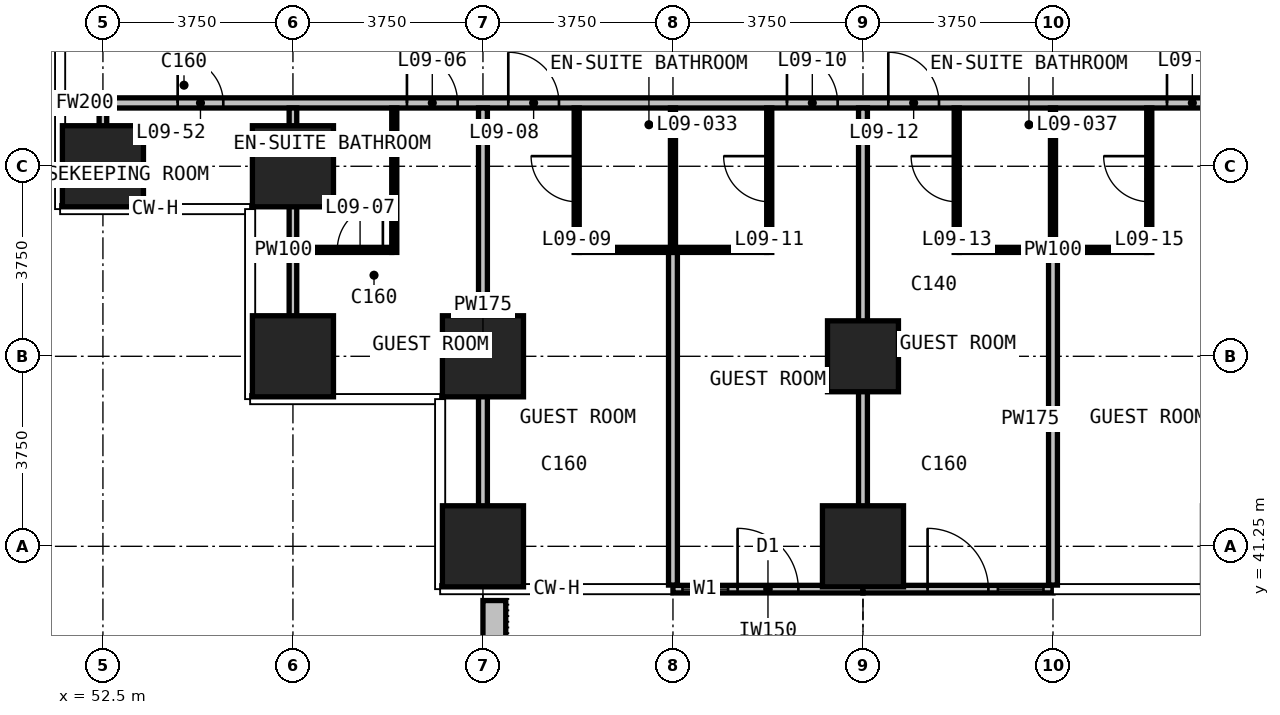
"""IFC4 building model, lengths in metres.
Left out: names, types, materials, properties, quantities, classifications, styles, units other than length and angle.
Written with IfcOpenShell. Run it as: python <this file> out.ifc"""

import sys

from ifc_helpers import new_model, si_unit, direction, frame, frame_2d, origin, origin_2d, place, context, subcontext, project, spatial, rectangle, extrude, element, fill, save


model = new_model("IFC4")
c1 = context("Model", 3, precision=1e-05, world=origin(), true_north=direction((0.0, 1.0)))
c2 = subcontext(c1, "Body", "Model", "MODEL_VIEW")
j1 = project(units=[si_unit("LENGTHUNIT", "METRE"), si_unit("PLANEANGLEUNIT", "RADIAN")], contexts=[c1])
p1 = place(None, origin())
s1 = spatial("IfcSite", under=j1, at=p1, CompositionType="ELEMENT")
p2 = place(p1, origin())
s2 = spatial("IfcBuilding", under=s1, at=p2, CompositionType="ELEMENT")
p3 = place(p2, frame((0.0, 0.0, 49.4)))
s3 = spatial("IfcBuildingStorey", under=s2, at=p3, CompositionType="ELEMENT", Elevation=49.4)
for number, where, z_axis, x_axis in (
    (1, (52.5, 48.75, 0.0), (0.0, 0.0, 1.0), (1.0, 0.0, 0.0)),
    (2, (56.25, 45.0, 0.0), (0.0, 0.0, 1.0), (1.0, 0.0, 0.0)),
    (3, (56.25, 48.75, 0.0), (0.0, 0.0, 1.0), (1.0, 0.0, 0.0)),
    (4, (60.0, 41.25, 0.0), (0.0, 0.0, 1.0), (1.0, 0.0, 0.0)),
    (5, (60.0, 45.0, 0.0), (0.0, 0.0, 1.0), (1.0, 0.0, 0.0)),
    (6, (67.5, 41.25, 0.0), (0.0, 0.0, 1.0), (1.0, 0.0, 0.0)),
):
    element("IfcColumn", number, at=place(p3, frame(where, z_axis=z_axis, x_axis=x_axis)), inside=s3, PredefinedType="COLUMN", context=c2, shape_type="SweptSolid", body=[
        extrude(rectangle(XDim=1.6, YDim=1.6, at=origin_2d()), origin(), (0.0, 0.0, 1.0), 3.3),
    ])
p4 = place(p3, frame((67.5, 45.0, 0.0), z_axis=(0.0, 0.0, 1.0), x_axis=(1.0, 0.0, 0.0)))
e7 = element("IfcColumn", 7, at=p4, inside=s3, PredefinedType="COLUMN", context=c2, shape_type="SweptSolid", body=[
    extrude(rectangle(XDim=1.4, YDim=1.4, at=origin_2d()), origin(), (0.0, 0.0, 1.0), 3.3),
])
p5 = place(p3, frame((63.75, 40.405, 0.0), z_axis=(0.0, 0.0, 1.0), x_axis=(1.0, 0.0, 0.0)))
e8 = element("IfcWall", 8, at=p5, inside=s3, PredefinedType="SOLIDWALL", context=c2, shape_type="SweptSolid", body=[
    extrude(rectangle(XDim=3.75, YDim=0.15, at=frame_2d((1.875, 0.0))), origin(), (0.0, 0.0, 1.0), 3.0),
])
p6 = place(p5, frame((0.188, 0.0, 0.1)))
e9 = element("IfcOpeningElement", 9, at=p6, cuts=e8, PredefinedType="OPENING", context=c2, shape_type="SweptSolid", body=[
    extrude(rectangle(XDim=0.9, YDim=2.4, at=frame_2d((0.45, 1.2))), frame((0.0, 0.085, 0.0), z_axis=(0.0, -1.0, 0.0), x_axis=(1.0, 0.0, 0.0)), (0.0, 0.0, 1.0), 0.17),
])
p7 = place(p5, frame((1.275, 0.0, 0.0)))
e10 = element("IfcOpeningElement", 10, at=p7, cuts=e8, PredefinedType="OPENING", context=c2, shape_type="SweptSolid", body=[
    extrude(rectangle(XDim=1.2, YDim=2.4, at=frame_2d((0.6, 1.2))), frame((0.0, 0.085, 0.0), z_axis=(0.0, -1.0, 0.0), x_axis=(1.0, 0.0, 0.0)), (0.0, 0.0, 1.0), 0.17),
])
p8 = place(p3, frame((67.5, 40.405, 0.0), z_axis=(0.0, 0.0, 1.0), x_axis=(1.0, 0.0, 0.0)))
e11 = element("IfcWall", 11, at=p8, inside=s3, PredefinedType="SOLIDWALL", context=c2, shape_type="SweptSolid", body=[
    extrude(rectangle(XDim=3.75, YDim=0.15, at=frame_2d((1.875, 0.0))), origin(), (0.0, 0.0, 1.0), 3.0),
])
p9 = place(p8, frame((1.275, 0.0, 0.0)))
e12 = element("IfcOpeningElement", 12, at=p9, cuts=e11, PredefinedType="OPENING", context=c2, shape_type="SweptSolid", body=[
    extrude(rectangle(XDim=1.2, YDim=2.4, at=frame_2d((0.6, 1.2))), frame((0.0, 0.085, 0.0), z_axis=(0.0, -1.0, 0.0), x_axis=(1.0, 0.0, 0.0)), (0.0, 0.0, 1.0), 0.17),
])
p10 = place(p8, frame((2.663, 0.0, 0.1)))
e13 = element("IfcOpeningElement", 13, at=p10, cuts=e11, PredefinedType="OPENING", context=c2, shape_type="SweptSolid", body=[
    extrude(rectangle(XDim=0.9, YDim=2.4, at=frame_2d((0.45, 1.2))), frame((0.0, 0.085, 0.0), z_axis=(0.0, -1.0, 0.0), x_axis=(1.0, 0.0, 0.0)), (0.0, 0.0, 1.0), 0.17),
])
p11 = place(p3, frame((60.225, 40.18, 0.0), z_axis=(0.0, 0.0, 1.0), x_axis=(0.0, -1.0, 0.0)))
e14 = element("IfcWall", 14, at=p11, inside=s3, PredefinedType="USERDEFINED", context=c2, shape_type="SweptSolid", body=[
    extrude(rectangle(XDim=2.33, YDim=0.45, at=frame_2d((1.165, 0.0))), origin(), (0.0, 0.0, 1.0), 1.1),
])
p12 = place(p3, frame((51.855, 50.0, 0.0), z_axis=(0.0, 0.0, 1.0), x_axis=(1.0, 0.0, 0.0)))
e15 = element("IfcWall", 15, at=p12, inside=s3, PredefinedType="PARTITIONING", context=c2, shape_type="SweptSolid", body=[
    extrude(rectangle(XDim=0.57, YDim=0.2, at=frame_2d((0.285, 0.0))), origin(), (0.0, 0.0, 1.0), 3.0),
])
p13 = place(p3, frame((52.575, 50.0, 0.0), z_axis=(0.0, 0.0, 1.0), x_axis=(1.0, 0.0, 0.0)))
e16 = element("IfcWall", 16, at=p13, inside=s3, PredefinedType="PARTITIONING", context=c2, shape_type="SweptSolid", body=[
    extrude(rectangle(XDim=44.85, YDim=0.2, at=frame_2d((22.425, 0.0))), origin(), (0.0, 0.0, 1.0), 3.0),
])
p14 = place(p13, frame((5.925, 0.0, 0.0)))
e17 = element("IfcOpeningElement", 17, at=p14, cuts=e16, PredefinedType="OPENING", context=c2, shape_type="SweptSolid", body=[
    extrude(rectangle(XDim=1.0, YDim=2.2, at=frame_2d((0.5, 1.1))), frame((0.0, 0.11, 0.0), z_axis=(0.0, -1.0, 0.0), x_axis=(1.0, 0.0, 0.0)), (0.0, 0.0, 1.0), 0.22),
])
p15 = place(p13, frame((7.925, 0.0, 0.0)))
e18 = element("IfcOpeningElement", 18, at=p15, cuts=e16, PredefinedType="OPENING", context=c2, shape_type="SweptSolid", body=[
    extrude(rectangle(XDim=1.0, YDim=2.2, at=frame_2d((0.5, 1.1))), frame((0.0, 0.11, 0.0), z_axis=(0.0, -1.0, 0.0), x_axis=(1.0, 0.0, 0.0)), (0.0, 0.0, 1.0), 0.22),
])
p16 = place(p13, frame((13.425, 0.0, 0.0)))
e19 = element("IfcOpeningElement", 19, at=p16, cuts=e16, PredefinedType="OPENING", context=c2, shape_type="SweptSolid", body=[
    extrude(rectangle(XDim=1.0, YDim=2.2, at=frame_2d((0.5, 1.1))), frame((0.0, 0.11, 0.0), z_axis=(0.0, -1.0, 0.0), x_axis=(1.0, 0.0, 0.0)), (0.0, 0.0, 1.0), 0.22),
])
p17 = place(p13, frame((15.425, 0.0, 0.0)))
e20 = element("IfcOpeningElement", 20, at=p17, cuts=e16, PredefinedType="OPENING", context=c2, shape_type="SweptSolid", body=[
    extrude(rectangle(XDim=1.0, YDim=2.2, at=frame_2d((0.5, 1.1))), frame((0.0, 0.11, 0.0), z_axis=(0.0, -1.0, 0.0), x_axis=(1.0, 0.0, 0.0)), (0.0, 0.0, 1.0), 0.22),
])
p18 = place(p13, frame((20.925, 0.0, 0.0)))
e21 = element("IfcOpeningElement", 21, at=p18, cuts=e16, PredefinedType="OPENING", context=c2, shape_type="SweptSolid", body=[
    extrude(rectangle(XDim=1.0, YDim=2.2, at=frame_2d((0.5, 1.1))), frame((0.0, 0.11, 0.0), z_axis=(0.0, -1.0, 0.0), x_axis=(1.0, 0.0, 0.0)), (0.0, 0.0, 1.0), 0.22),
])
p19 = place(p13, frame((22.925, 0.0, 0.0)))
e22 = element("IfcOpeningElement", 22, at=p19, cuts=e16, PredefinedType="OPENING", context=c2, shape_type="SweptSolid", body=[
    extrude(rectangle(XDim=1.0, YDim=2.2, at=frame_2d((0.5, 1.1))), frame((0.0, 0.11, 0.0), z_axis=(0.0, -1.0, 0.0), x_axis=(1.0, 0.0, 0.0)), (0.0, 0.0, 1.0), 0.22),
])
p20 = place(p13, frame((28.425, 0.0, 0.0)))
e23 = element("IfcOpeningElement", 23, at=p20, cuts=e16, PredefinedType="OPENING", context=c2, shape_type="SweptSolid", body=[
    extrude(rectangle(XDim=1.0, YDim=2.2, at=frame_2d((0.5, 1.1))), frame((0.0, 0.11, 0.0), z_axis=(0.0, -1.0, 0.0), x_axis=(1.0, 0.0, 0.0)), (0.0, 0.0, 1.0), 0.22),
])
p21 = place(p13, frame((30.425, 0.0, 0.0)))
e24 = element("IfcOpeningElement", 24, at=p21, cuts=e16, PredefinedType="OPENING", context=c2, shape_type="SweptSolid", body=[
    extrude(rectangle(XDim=1.0, YDim=2.2, at=frame_2d((0.5, 1.1))), frame((0.0, 0.11, 0.0), z_axis=(0.0, -1.0, 0.0), x_axis=(1.0, 0.0, 0.0)), (0.0, 0.0, 1.0), 0.22),
])
p22 = place(p13, frame((35.925, 0.0, 0.0)))
e25 = element("IfcOpeningElement", 25, at=p22, cuts=e16, PredefinedType="OPENING", context=c2, shape_type="SweptSolid", body=[
    extrude(rectangle(XDim=1.0, YDim=2.2, at=frame_2d((0.5, 1.1))), frame((0.0, 0.11, 0.0), z_axis=(0.0, -1.0, 0.0), x_axis=(1.0, 0.0, 0.0)), (0.0, 0.0, 1.0), 0.22),
])
p23 = place(p13, frame((37.925, 0.0, 0.0)))
e26 = element("IfcOpeningElement", 26, at=p23, cuts=e16, PredefinedType="OPENING", context=c2, shape_type="SweptSolid", body=[
    extrude(rectangle(XDim=1.0, YDim=2.2, at=frame_2d((0.5, 1.1))), frame((0.0, 0.11, 0.0), z_axis=(0.0, -1.0, 0.0), x_axis=(1.0, 0.0, 0.0)), (0.0, 0.0, 1.0), 0.22),
])
p24 = place(p13, frame((1.4, 0.0, 0.0)))
e27 = element("IfcOpeningElement", 27, at=p24, cuts=e16, PredefinedType="OPENING", context=c2, shape_type="SweptSolid", body=[
    extrude(rectangle(XDim=0.9, YDim=2.2, at=frame_2d((0.45, 1.1))), frame((0.0, 0.11, 0.0), z_axis=(0.0, -1.0, 0.0), x_axis=(1.0, 0.0, 0.0)), (0.0, 0.0, 1.0), 0.22),
])
p25 = place(p13, frame((42.575, 0.0, 0.0)))
e28 = element("IfcOpeningElement", 28, at=p25, cuts=e16, PredefinedType="OPENING", context=c2, shape_type="SweptSolid", body=[
    extrude(rectangle(XDim=0.9, YDim=2.2, at=frame_2d((0.45, 1.1))), frame((0.0, 0.11, 0.0), z_axis=(0.0, -1.0, 0.0), x_axis=(1.0, 0.0, 0.0)), (0.0, 0.0, 1.0), 0.22),
])
p26 = place(p3, frame((60.0, 40.485, 0.0), z_axis=(0.0, 0.0, 1.0), x_axis=(0.0, 1.0, 0.0)))
e29 = element("IfcWall", 29, at=p26, inside=s3, PredefinedType="PARTITIONING", context=c2, shape_type="SweptSolid", body=[
    extrude(rectangle(XDim=9.415, YDim=0.175, at=frame_2d((4.708, 0.0))), origin(), (0.0, 0.0, 1.0), 3.0),
])
p27 = place(p3, frame((63.75, 40.485, 0.0), z_axis=(0.0, 0.0, 1.0), x_axis=(0.0, 1.0, 0.0)))
e30 = element("IfcWall", 30, at=p27, inside=s3, PredefinedType="PARTITIONING", context=c2, shape_type="SweptSolid", body=[
    extrude(rectangle(XDim=6.565, YDim=0.175, at=frame_2d((3.282, 0.0))), origin(), (0.0, 0.0, 1.0), 3.0),
])
p28 = place(p3, frame((67.5, 40.485, 0.0), z_axis=(0.0, 0.0, 1.0), x_axis=(0.0, 1.0, 0.0)))
e31 = element("IfcWall", 31, at=p28, inside=s3, PredefinedType="PARTITIONING", context=c2, shape_type="SweptSolid", body=[
    extrude(rectangle(XDim=9.415, YDim=0.175, at=frame_2d((4.708, 0.0))), origin(), (0.0, 0.0, 1.0), 3.0),
])
p29 = place(p3, frame((71.25, 40.485, 0.0), z_axis=(0.0, 0.0, 1.0), x_axis=(0.0, 1.0, 0.0)))
e32 = element("IfcWall", 32, at=p29, inside=s3, PredefinedType="PARTITIONING", context=c2, shape_type="SweptSolid", body=[
    extrude(rectangle(XDim=6.565, YDim=0.175, at=frame_2d((3.282, 0.0))), origin(), (0.0, 0.0, 1.0), 3.0),
])
p30 = place(p3, frame((52.5, 48.105, 0.0), z_axis=(0.0, 0.0, 1.0), x_axis=(0.0, 1.0, 0.0)))
e33 = element("IfcWall", 33, at=p30, inside=s3, PredefinedType="PARTITIONING", context=c2, shape_type="SweptSolid", body=[
    extrude(rectangle(XDim=1.995, YDim=0.15, at=frame_2d((0.998, 0.0))), origin(), (0.0, 0.0, 1.0), 3.0),
])
p31 = place(p3, frame((56.25, 44.235, 0.0), z_axis=(0.0, 0.0, 1.0), x_axis=(0.0, 1.0, 0.0)))
e34 = element("IfcWall", 34, at=p31, inside=s3, PredefinedType="PARTITIONING", context=c2, shape_type="SweptSolid", body=[
    extrude(rectangle(XDim=5.665, YDim=0.15, at=frame_2d((2.833, 0.0))), origin(), (0.0, 0.0, 1.0), 3.0),
])
p32 = place(p3, frame((56.325, 47.1, 0.0), z_axis=(0.0, 0.0, 1.0), x_axis=(1.0, 0.0, 0.0)))
e35 = element("IfcWall", 35, at=p32, inside=s3, PredefinedType="PARTITIONING", context=c2, shape_type="SweptSolid", body=[
    extrude(rectangle(XDim=1.875, YDim=0.1, at=frame_2d((0.938, 0.0))), origin(), (0.0, 0.0, 1.0), 3.0),
])
p33 = place(p32, frame((0.8, 0.0, 0.0)))
e36 = element("IfcOpeningElement", 36, at=p33, cuts=e35, PredefinedType="OPENING", context=c2, shape_type="SweptSolid", body=[
    extrude(rectangle(XDim=0.9, YDim=2.2, at=frame_2d((0.45, 1.1))), frame((0.0, 0.06, 0.0), z_axis=(0.0, -1.0, 0.0), x_axis=(1.0, 0.0, 0.0)), (0.0, 0.0, 1.0), 0.12),
])
for number, where, z_axis, x_axis in (
    (37, (61.9, 47.1, 0.0), (0.0, 0.0, 1.0), (1.0, 0.0, 0.0)),
    (38, (69.4, 47.1, 0.0), (0.0, 0.0, 1.0), (1.0, 0.0, 0.0)),
):
    element("IfcWall", number, at=place(p3, frame(where, z_axis=z_axis, x_axis=x_axis)), inside=s3, PredefinedType="PARTITIONING", context=c2, shape_type="SweptSolid", body=[
        extrude(rectangle(XDim=3.7, YDim=0.1, at=frame_2d((1.85, 0.0))), origin(), (0.0, 0.0, 1.0), 3.0),
    ])
p34 = place(p3, frame((58.25, 47.05, 0.0), z_axis=(0.0, 0.0, 1.0), x_axis=(0.0, 1.0, 0.0)))
e39 = element("IfcWall", 39, at=p34, inside=s3, PredefinedType="PARTITIONING", context=c2, shape_type="SweptSolid", body=[
    extrude(rectangle(XDim=2.85, YDim=0.1, at=frame_2d((1.425, 0.0))), origin(), (0.0, 0.0, 1.0), 3.0),
])
p35 = place(p3, frame((61.85, 47.05, 0.0), z_axis=(0.0, 0.0, 1.0), x_axis=(0.0, 1.0, 0.0)))
e40 = element("IfcWall", 40, at=p35, inside=s3, PredefinedType="PARTITIONING", context=c2, shape_type="SweptSolid", body=[
    extrude(rectangle(XDim=2.85, YDim=0.1, at=frame_2d((1.425, 0.0))), origin(), (0.0, 0.0, 1.0), 3.0),
])
p36 = place(p35, frame((1.0, 0.0, 0.0)))
e41 = element("IfcOpeningElement", 41, at=p36, cuts=e40, PredefinedType="OPENING", context=c2, shape_type="SweptSolid", body=[
    extrude(rectangle(XDim=0.9, YDim=2.2, at=frame_2d((0.45, 1.1))), frame((0.0, 0.06, 0.0), z_axis=(0.0, -1.0, 0.0), x_axis=(1.0, 0.0, 0.0)), (0.0, 0.0, 1.0), 0.12),
])
p37 = place(p3, frame((63.75, 47.15, 0.0), z_axis=(0.0, 0.0, 1.0), x_axis=(0.0, 1.0, 0.0)))
e42 = element("IfcWall", 42, at=p37, inside=s3, PredefinedType="PARTITIONING", context=c2, shape_type="SweptSolid", body=[
    extrude(rectangle(XDim=2.75, YDim=0.1, at=frame_2d((1.375, 0.0))), origin(), (0.0, 0.0, 1.0), 3.0),
])
p38 = place(p3, frame((65.65, 47.05, 0.0), z_axis=(0.0, 0.0, 1.0), x_axis=(0.0, 1.0, 0.0)))
e43 = element("IfcWall", 43, at=p38, inside=s3, PredefinedType="PARTITIONING", context=c2, shape_type="SweptSolid", body=[
    extrude(rectangle(XDim=2.85, YDim=0.1, at=frame_2d((1.425, 0.0))), origin(), (0.0, 0.0, 1.0), 3.0),
])
p39 = place(p38, frame((1.0, 0.0, 0.0)))
e44 = element("IfcOpeningElement", 44, at=p39, cuts=e43, PredefinedType="OPENING", context=c2, shape_type="SweptSolid", body=[
    extrude(rectangle(XDim=0.9, YDim=2.2, at=frame_2d((0.45, 1.1))), frame((0.0, 0.06, 0.0), z_axis=(0.0, -1.0, 0.0), x_axis=(1.0, 0.0, 0.0)), (0.0, 0.0, 1.0), 0.12),
])
p40 = place(p3, frame((69.35, 47.05, 0.0), z_axis=(0.0, 0.0, 1.0), x_axis=(0.0, 1.0, 0.0)))
e45 = element("IfcWall", 45, at=p40, inside=s3, PredefinedType="PARTITIONING", context=c2, shape_type="SweptSolid", body=[
    extrude(rectangle(XDim=2.85, YDim=0.1, at=frame_2d((1.425, 0.0))), origin(), (0.0, 0.0, 1.0), 3.0),
])
p41 = place(p40, frame((1.0, 0.0, 0.0)))
e46 = element("IfcOpeningElement", 46, at=p41, cuts=e45, PredefinedType="OPENING", context=c2, shape_type="SweptSolid", body=[
    extrude(rectangle(XDim=0.9, YDim=2.2, at=frame_2d((0.45, 1.1))), frame((0.0, 0.06, 0.0), z_axis=(0.0, -1.0, 0.0), x_axis=(1.0, 0.0, 0.0)), (0.0, 0.0, 1.0), 0.12),
])
p42 = place(p3, frame((71.25, 47.15, 0.0), z_axis=(0.0, 0.0, 1.0), x_axis=(0.0, 1.0, 0.0)))
e47 = element("IfcWall", 47, at=p42, inside=s3, PredefinedType="PARTITIONING", context=c2, shape_type="SweptSolid", body=[
    extrude(rectangle(XDim=2.75, YDim=0.1, at=frame_2d((1.375, 0.0))), origin(), (0.0, 0.0, 1.0), 3.0),
])
p43 = place(p3, frame((73.15, 47.05, 0.0), z_axis=(0.0, 0.0, 1.0), x_axis=(0.0, 1.0, 0.0)))
e48 = element("IfcWall", 48, at=p43, inside=s3, PredefinedType="PARTITIONING", context=c2, shape_type="SweptSolid", body=[
    extrude(rectangle(XDim=2.85, YDim=0.1, at=frame_2d((1.425, 0.0))), origin(), (0.0, 0.0, 1.0), 3.0),
])
p44 = place(p43, frame((1.0, 0.0, 0.0)))
e49 = element("IfcOpeningElement", 49, at=p44, cuts=e48, PredefinedType="OPENING", context=c2, shape_type="SweptSolid", body=[
    extrude(rectangle(XDim=0.9, YDim=2.2, at=frame_2d((0.45, 1.1))), frame((0.0, 0.06, 0.0), z_axis=(0.0, -1.0, 0.0), x_axis=(1.0, 0.0, 0.0)), (0.0, 0.0, 1.0), 0.12),
])
p45 = place(p6, origin())
e50 = element("IfcWindow", 50, at=p45, inside=s3, PartitioningType="SINGLE_PANEL", PredefinedType="WINDOW", context=c2, shape_type="SweptSolid", body=[
    extrude(rectangle(XDim=0.9, YDim=2.4, at=frame_2d((0.45, 1.2))), frame((0.0, 0.03, 0.0), z_axis=(0.0, -1.0, 0.0), x_axis=(1.0, 0.0, 0.0)), (0.0, 0.0, 1.0), 0.06),
])
fill(e9, e50)
p46 = place(p7, origin())
e51 = element("IfcDoor", 51, at=p46, inside=s3, OperationType="SINGLE_SWING_LEFT", PredefinedType="DOOR", context=c2, shape_type="SweptSolid", body=[
    extrude(rectangle(XDim=1.2, YDim=2.4, at=frame_2d((0.6, 1.2))), frame((0.0, 0.025, 0.0), z_axis=(0.0, -1.0, 0.0), x_axis=(1.0, 0.0, 0.0)), (0.0, 0.0, 1.0), 0.05),
])
fill(e10, e51)
p47 = place(p9, origin())
e52 = element("IfcDoor", 52, at=p47, inside=s3, OperationType="SINGLE_SWING_LEFT", PredefinedType="DOOR", context=c2, shape_type="SweptSolid", body=[
    extrude(rectangle(XDim=1.2, YDim=2.4, at=frame_2d((0.6, 1.2))), frame((0.0, 0.025, 0.0), z_axis=(0.0, -1.0, 0.0), x_axis=(1.0, 0.0, 0.0)), (0.0, 0.0, 1.0), 0.05),
])
fill(e12, e52)
p48 = place(p10, origin())
e53 = element("IfcWindow", 53, at=p48, inside=s3, PartitioningType="SINGLE_PANEL", PredefinedType="WINDOW", context=c2, shape_type="SweptSolid", body=[
    extrude(rectangle(XDim=0.9, YDim=2.4, at=frame_2d((0.45, 1.2))), frame((0.0, 0.03, 0.0), z_axis=(0.0, -1.0, 0.0), x_axis=(1.0, 0.0, 0.0)), (0.0, 0.0, 1.0), 0.06),
])
fill(e13, e53)
p49 = place(p14, origin())
e54 = element("IfcDoor", 54, at=p49, inside=s3, OperationType="SINGLE_SWING_LEFT", PredefinedType="DOOR", context=c2, shape_type="SweptSolid", body=[
    extrude(rectangle(XDim=1.0, YDim=2.2, at=frame_2d((0.5, 1.1))), frame((0.0, 0.025, 0.0), z_axis=(0.0, -1.0, 0.0), x_axis=(1.0, 0.0, 0.0)), (0.0, 0.0, 1.0), 0.05),
])
fill(e17, e54)
p50 = place(p33, origin())
e55 = element("IfcDoor", 55, at=p50, inside=s3, OperationType="SINGLE_SWING_RIGHT", PredefinedType="DOOR", context=c2, shape_type="SweptSolid", body=[
    extrude(rectangle(XDim=0.9, YDim=2.2, at=frame_2d((0.45, 1.1))), frame((0.0, 0.025, 0.0), z_axis=(0.0, -1.0, 0.0), x_axis=(1.0, 0.0, 0.0)), (0.0, 0.0, 1.0), 0.05),
])
fill(e36, e55)
p51 = place(p15, origin())
e56 = element("IfcDoor", 56, at=p51, inside=s3, OperationType="SINGLE_SWING_LEFT", PredefinedType="DOOR", context=c2, shape_type="SweptSolid", body=[
    extrude(rectangle(XDim=1.0, YDim=2.2, at=frame_2d((0.5, 1.1))), frame((0.0, 0.025, 0.0), z_axis=(0.0, -1.0, 0.0), x_axis=(1.0, 0.0, 0.0)), (0.0, 0.0, 1.0), 0.05),
])
fill(e18, e56)
p52 = place(p36, origin())
e57 = element("IfcDoor", 57, at=p52, inside=s3, OperationType="SINGLE_SWING_RIGHT", PredefinedType="DOOR", context=c2, shape_type="SweptSolid", body=[
    extrude(rectangle(XDim=0.9, YDim=2.2, at=frame_2d((0.45, 1.1))), frame((0.0, 0.025, 0.0), z_axis=(0.0, -1.0, 0.0), x_axis=(1.0, 0.0, 0.0)), (0.0, 0.0, 1.0), 0.05),
])
fill(e41, e57)
p53 = place(p16, origin())
e58 = element("IfcDoor", 58, at=p53, inside=s3, OperationType="SINGLE_SWING_LEFT", PredefinedType="DOOR", context=c2, shape_type="SweptSolid", body=[
    extrude(rectangle(XDim=1.0, YDim=2.2, at=frame_2d((0.5, 1.1))), frame((0.0, 0.025, 0.0), z_axis=(0.0, -1.0, 0.0), x_axis=(1.0, 0.0, 0.0)), (0.0, 0.0, 1.0), 0.05),
])
fill(e19, e58)
p54 = place(p39, origin())
e59 = element("IfcDoor", 59, at=p54, inside=s3, OperationType="SINGLE_SWING_RIGHT", PredefinedType="DOOR", context=c2, shape_type="SweptSolid", body=[
    extrude(rectangle(XDim=0.9, YDim=2.2, at=frame_2d((0.45, 1.1))), frame((0.0, 0.025, 0.0), z_axis=(0.0, -1.0, 0.0), x_axis=(1.0, 0.0, 0.0)), (0.0, 0.0, 1.0), 0.05),
])
fill(e44, e59)
p55 = place(p17, origin())
e60 = element("IfcDoor", 60, at=p55, inside=s3, OperationType="SINGLE_SWING_LEFT", PredefinedType="DOOR", context=c2, shape_type="SweptSolid", body=[
    extrude(rectangle(XDim=1.0, YDim=2.2, at=frame_2d((0.5, 1.1))), frame((0.0, 0.025, 0.0), z_axis=(0.0, -1.0, 0.0), x_axis=(1.0, 0.0, 0.0)), (0.0, 0.0, 1.0), 0.05),
])
fill(e20, e60)
p56 = place(p41, origin())
e61 = element("IfcDoor", 61, at=p56, inside=s3, OperationType="SINGLE_SWING_RIGHT", PredefinedType="DOOR", context=c2, shape_type="SweptSolid", body=[
    extrude(rectangle(XDim=0.9, YDim=2.2, at=frame_2d((0.45, 1.1))), frame((0.0, 0.025, 0.0), z_axis=(0.0, -1.0, 0.0), x_axis=(1.0, 0.0, 0.0)), (0.0, 0.0, 1.0), 0.05),
])
fill(e46, e61)
p57 = place(p18, origin())
e62 = element("IfcDoor", 62, at=p57, inside=s3, OperationType="SINGLE_SWING_RIGHT", PredefinedType="DOOR", context=c2, shape_type="SweptSolid", body=[
    extrude(rectangle(XDim=1.0, YDim=2.2, at=frame_2d((0.5, 1.1))), frame((0.0, 0.025, 0.0), z_axis=(0.0, -1.0, 0.0), x_axis=(1.0, 0.0, 0.0)), (0.0, 0.0, 1.0), 0.05),
])
fill(e21, e62)
p58 = place(p44, origin())
e63 = element("IfcDoor", 63, at=p58, inside=s3, OperationType="SINGLE_SWING_RIGHT", PredefinedType="DOOR", context=c2, shape_type="SweptSolid", body=[
    extrude(rectangle(XDim=0.9, YDim=2.2, at=frame_2d((0.45, 1.1))), frame((0.0, 0.025, 0.0), z_axis=(0.0, -1.0, 0.0), x_axis=(1.0, 0.0, 0.0)), (0.0, 0.0, 1.0), 0.05),
])
fill(e49, e63)
p59 = place(p24, origin())
e64 = element("IfcDoor", 64, at=p59, inside=s3, OperationType="SINGLE_SWING_RIGHT", PredefinedType="DOOR", context=c2, shape_type="SweptSolid", body=[
    extrude(rectangle(XDim=0.9, YDim=2.2, at=frame_2d((0.45, 1.1))), frame((0.0, 0.025, 0.0), z_axis=(0.0, -1.0, 0.0), x_axis=(1.0, 0.0, 0.0)), (0.0, 0.0, 1.0), 0.05),
])
fill(e27, e64)
save(model, sys.argv[1])
